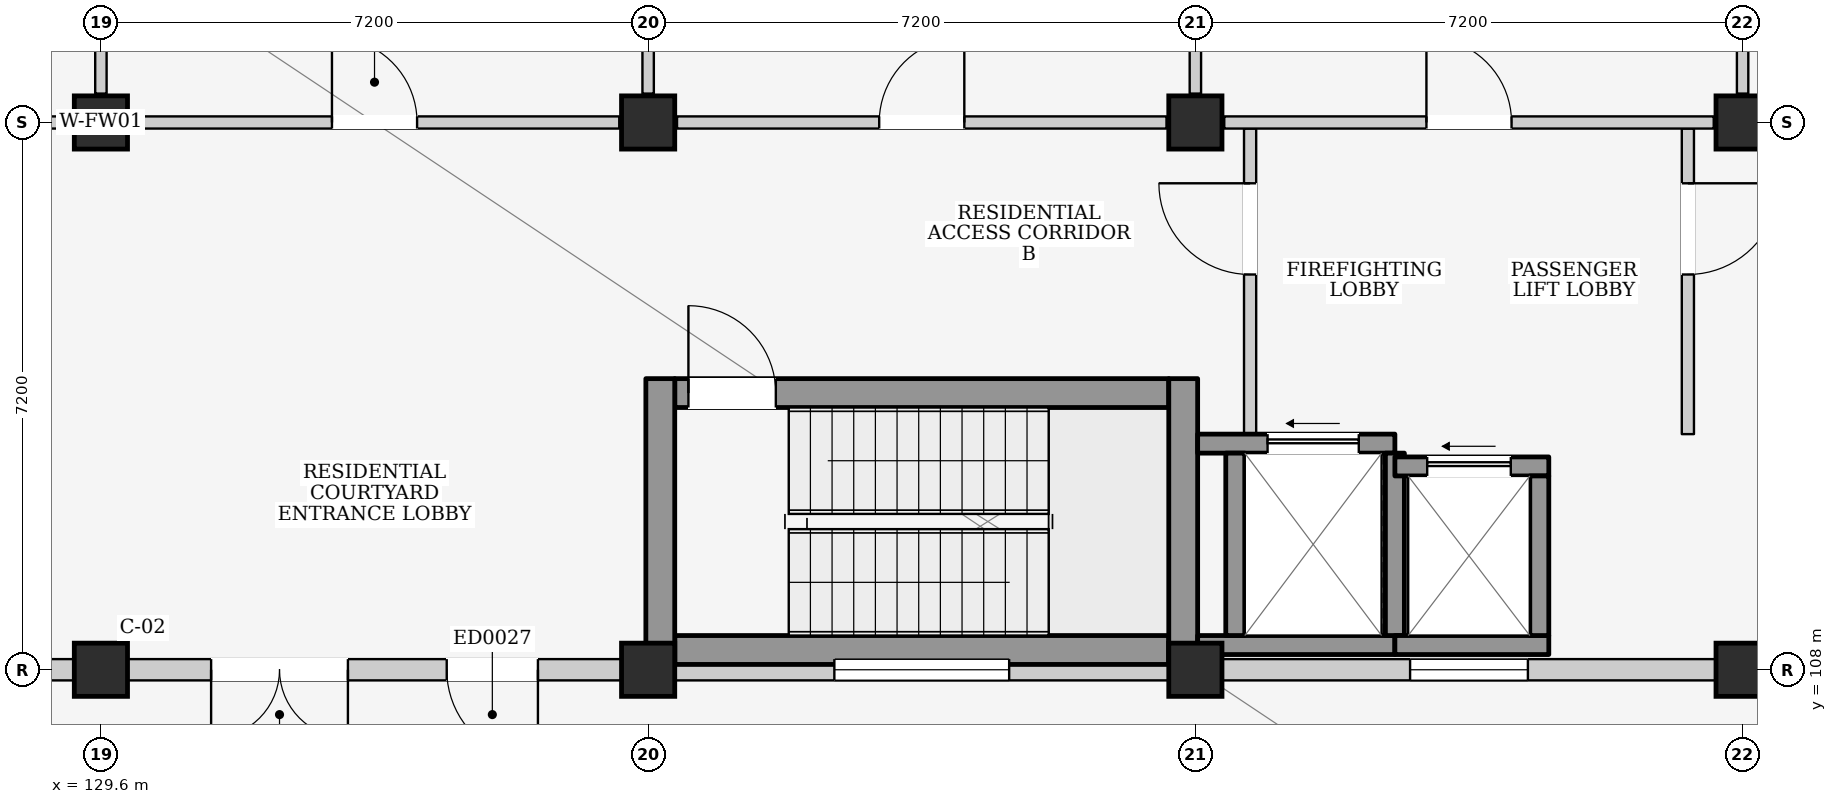
"""IFC4 building model, lengths in metres.
Left out: names, types, materials, properties, quantities, classifications, styles, units other than length and angle.
Written with IfcOpenShell. Run it as: python <this file> out.ifc"""

import sys

from ifc_helpers import new_model, si_unit, direction, frame, frame_2d, origin, origin_2d, place, context, subcontext, project, spatial, rectangle, extrude, element, fill, save


model = new_model("IFC4")
c1 = context("Model", 3, precision=1e-05, world=origin(), true_north=direction((0.0, 1.0)))
c2 = subcontext(c1, "Body", "Model", "MODEL_VIEW")
j1 = project(units=[si_unit("LENGTHUNIT", "METRE"), si_unit("PLANEANGLEUNIT", "RADIAN")], contexts=[c1])
p1 = place(None, origin())
s1 = spatial("IfcSite", under=j1, at=p1, CompositionType="ELEMENT")
p2 = place(p1, origin())
s2 = spatial("IfcBuilding", under=s1, at=p2, CompositionType="ELEMENT")
p3 = place(p2, origin())
s3 = spatial("IfcBuildingStorey", under=s2, at=p3, CompositionType="ELEMENT", Elevation=0.0)
for number, where, z_axis, x_axis in (
    (1, (129.6, 108.0, 0.0), (0.0, 0.0, 1.0), (1.0, 0.0, 0.0)),
    (2, (129.6, 115.2, 0.0), (0.0, 0.0, 1.0), (1.0, 0.0, 0.0)),
    (3, (136.8, 108.0, 0.0), (0.0, 0.0, 1.0), (1.0, 0.0, 0.0)),
    (4, (136.8, 115.2, 0.0), (0.0, 0.0, 1.0), (1.0, 0.0, 0.0)),
    (5, (144.0, 108.0, 0.0), (0.0, 0.0, 1.0), (1.0, 0.0, 0.0)),
    (6, (144.0, 115.2, 0.0), (0.0, 0.0, 1.0), (1.0, 0.0, 0.0)),
    (7, (151.2, 108.0, 0.0), (0.0, 0.0, 1.0), (1.0, 0.0, 0.0)),
    (8, (151.2, 115.2, 0.0), (0.0, 0.0, 1.0), (1.0, 0.0, 0.0)),
):
    element("IfcColumn", number, at=place(p3, frame(where, z_axis=z_axis, x_axis=x_axis)), inside=s3, PredefinedType="COLUMN", context=c2, shape_type="SweptSolid", body=[
        extrude(rectangle(XDim=0.7, YDim=0.7, at=origin_2d()), origin(), (0.0, 0.0, 1.0), 4.5),
    ])
p4 = place(p3, frame((122.75, 108.0, 0.0), z_axis=(0.0, 0.0, 1.0), x_axis=(1.0, 0.0, 0.0)))
e9 = element("IfcWall", 9, at=p4, inside=s3, PredefinedType="ELEMENTEDWALL", context=c2, shape_type="SweptSolid", body=[
    extrude(rectangle(XDim=6.5, YDim=0.28, at=frame_2d((3.25, 0.0))), origin(), (0.0, 0.0, 1.0), 3.435),
])
p5 = place(p4, frame((2.425, 0.0, 0.95)))
e10 = element("IfcOpeningElement", 10, at=p5, cuts=e9, PredefinedType="OPENING", context=c2, shape_type="SweptSolid", body=[
    extrude(rectangle(XDim=1.65, YDim=1.35, at=frame_2d((0.825, 0.675))), frame((0.0, 0.155, 0.0), z_axis=(0.0, -1.0, 0.0), x_axis=(1.0, 0.0, 0.0)), (0.0, 0.0, 1.0), 0.31),
])
p6 = place(p3, frame((129.95, 108.0, 0.0), z_axis=(0.0, 0.0, 1.0), x_axis=(1.0, 0.0, 0.0)))
e11 = element("IfcWall", 11, at=p6, inside=s3, PredefinedType="ELEMENTEDWALL", context=c2, shape_type="SweptSolid", body=[
    extrude(rectangle(XDim=6.5, YDim=0.28, at=frame_2d((3.25, 0.0))), origin(), (0.0, 0.0, 1.0), 3.435),
])
p7 = place(p6, frame((1.1, 0.0, 0.0)))
e12 = element("IfcOpeningElement", 12, at=p7, cuts=e11, PredefinedType="OPENING", context=c2, shape_type="SweptSolid", body=[
    extrude(rectangle(XDim=1.8, YDim=2.4, at=frame_2d((0.9, 1.2))), frame((0.0, 0.155, 0.0), z_axis=(0.0, -1.0, 0.0), x_axis=(1.0, 0.0, 0.0)), (0.0, 0.0, 1.0), 0.31),
])
p8 = place(p6, frame((4.2, 0.0, 0.0)))
e13 = element("IfcOpeningElement", 13, at=p8, cuts=e11, PredefinedType="OPENING", context=c2, shape_type="SweptSolid", body=[
    extrude(rectangle(XDim=1.2, YDim=2.15, at=frame_2d((0.6, 1.075))), frame((0.0, 0.155, 0.0), z_axis=(0.0, -1.0, 0.0), x_axis=(1.0, 0.0, 0.0)), (0.0, 0.0, 1.0), 0.31),
])
p9 = place(p3, frame((137.15, 108.0, 0.0), z_axis=(0.0, 0.0, 1.0), x_axis=(1.0, 0.0, 0.0)))
e14 = element("IfcWall", 14, at=p9, inside=s3, PredefinedType="ELEMENTEDWALL", context=c2, shape_type="SweptSolid", body=[
    extrude(rectangle(XDim=6.5, YDim=0.28, at=frame_2d((3.25, 0.0))), origin(), (0.0, 0.0, 1.0), 3.435),
])
p10 = place(p9, frame((2.1, 0.0, 0.95)))
e15 = element("IfcOpeningElement", 15, at=p10, cuts=e14, PredefinedType="OPENING", context=c2, shape_type="SweptSolid", body=[
    extrude(rectangle(XDim=2.3, YDim=1.6, at=frame_2d((1.15, 0.8))), frame((0.0, 0.155, 0.0), z_axis=(0.0, -1.0, 0.0), x_axis=(1.0, 0.0, 0.0)), (0.0, 0.0, 1.0), 0.31),
])
p11 = place(p3, frame((144.35, 108.0, 0.0), z_axis=(0.0, 0.0, 1.0), x_axis=(1.0, 0.0, 0.0)))
e16 = element("IfcWall", 16, at=p11, inside=s3, PredefinedType="ELEMENTEDWALL", context=c2, shape_type="SweptSolid", body=[
    extrude(rectangle(XDim=6.5, YDim=0.28, at=frame_2d((3.25, 0.0))), origin(), (0.0, 0.0, 1.0), 3.435),
])
p12 = place(p11, frame((2.475, 0.0, 0.95)))
e17 = element("IfcOpeningElement", 17, at=p12, cuts=e16, PredefinedType="OPENING", context=c2, shape_type="SweptSolid", body=[
    extrude(rectangle(XDim=1.55, YDim=1.45, at=frame_2d((0.775, 0.725))), frame((0.0, 0.155, 0.0), z_axis=(0.0, -1.0, 0.0), x_axis=(1.0, 0.0, 0.0)), (0.0, 0.0, 1.0), 0.31),
])
p13 = place(p3, frame((137.15, 108.26, 0.0), z_axis=(0.0, 0.0, 1.0), x_axis=(1.0, 0.0, 0.0)))
e18 = element("IfcWall", 18, at=p13, inside=s3, PredefinedType="SHEAR", context=c2, shape_type="SweptSolid", body=[
    extrude(rectangle(XDim=6.5, YDim=0.38, at=frame_2d((3.25, 0.0))), origin(), (0.0, 0.0, 1.0), 4.2),
])
p14 = place(p3, frame((137.15, 111.64, 0.0), z_axis=(0.0, 0.0, 1.0), x_axis=(1.0, 0.0, 0.0)))
e19 = element("IfcWall", 19, at=p14, inside=s3, PredefinedType="SHEAR", context=c2, shape_type="SweptSolid", body=[
    extrude(rectangle(XDim=6.5, YDim=0.38, at=frame_2d((3.25, 0.0))), origin(), (0.0, 0.0, 1.0), 4.2),
])
p15 = place(p14, frame((0.18, 0.0, 0.0)))
e20 = element("IfcOpeningElement", 20, at=p15, cuts=e19, PredefinedType="OPENING", context=c2, shape_type="SweptSolid", body=[
    extrude(rectangle(XDim=1.15, YDim=2.2, at=frame_2d((0.575, 1.1))), frame((0.0, 0.205, 0.0), z_axis=(0.0, -1.0, 0.0), x_axis=(1.0, 0.0, 0.0)), (0.0, 0.0, 1.0), 0.41),
])
for number, where, z_axis, x_axis in (
    (21, (136.96, 108.07, 0.0), (0.0, 0.0, 1.0), (0.0, 1.0, 0.0)),
    (22, (143.84, 108.07, 0.0), (0.0, 0.0, 1.0), (0.0, 1.0, 0.0)),
):
    element("IfcWall", number, at=place(p3, frame(where, z_axis=z_axis, x_axis=x_axis)), inside=s3, PredefinedType="SHEAR", context=c2, shape_type="SweptSolid", body=[
        extrude(rectangle(XDim=3.76, YDim=0.38, at=frame_2d((1.88, 0.0))), origin(), (0.0, 0.0, 1.0), 4.2),
    ])
p16 = place(p3, frame((144.72, 111.1, 0.0), z_axis=(0.0, 0.0, 1.0), x_axis=(0.0, 1.0, 0.0)))
e23 = element("IfcWall", 23, at=p16, inside=s3, PredefinedType="PARTITIONING", context=c2, shape_type="SweptSolid", body=[
    extrude(rectangle(XDim=4.02, YDim=0.16, at=frame_2d((2.01, 0.0))), origin(), (0.0, 0.0, 1.0), 4.2),
])
p17 = place(p16, frame((2.1, 0.0, 0.0)))
e24 = element("IfcOpeningElement", 24, at=p17, cuts=e23, PredefinedType="OPENING", context=c2, shape_type="SweptSolid", body=[
    extrude(rectangle(XDim=1.2, YDim=2.2, at=frame_2d((0.6, 1.1))), frame((0.0, 0.095, 0.0), z_axis=(0.0, -1.0, 0.0), x_axis=(1.0, 0.0, 0.0)), (0.0, 0.0, 1.0), 0.19),
])
p18 = place(p3, frame((150.48, 111.1, 0.0), z_axis=(0.0, 0.0, 1.0), x_axis=(0.0, 1.0, 0.0)))
e25 = element("IfcWall", 25, at=p18, inside=s3, PredefinedType="PARTITIONING", context=c2, shape_type="SweptSolid", body=[
    extrude(rectangle(XDim=4.02, YDim=0.16, at=frame_2d((2.01, 0.0))), origin(), (0.0, 0.0, 1.0), 4.2),
])
p19 = place(p18, frame((2.1, 0.0, 0.0)))
e26 = element("IfcOpeningElement", 26, at=p19, cuts=e25, PredefinedType="OPENING", context=c2, shape_type="SweptSolid", body=[
    extrude(rectangle(XDim=1.2, YDim=2.2, at=frame_2d((0.6, 1.1))), frame((0.0, 0.095, 0.0), z_axis=(0.0, -1.0, 0.0), x_axis=(1.0, 0.0, 0.0)), (0.0, 0.0, 1.0), 0.19),
])
p20 = place(p3, frame((144.03, 108.325, 0.0), z_axis=(0.0, 0.0, 1.0), x_axis=(1.0, 0.0, 0.0)))
e27 = element("IfcWall", 27, at=p20, inside=s3, PredefinedType="SHEAR", context=c2, shape_type="SweptSolid", body=[
    extrude(rectangle(XDim=2.595, YDim=0.25, at=frame_2d((1.297, 0.0))), origin(), (0.0, 0.0, 1.0), 4.2),
])
p21 = place(p3, frame((144.03, 110.975, 0.0), z_axis=(0.0, 0.0, 1.0), x_axis=(1.0, 0.0, 0.0)))
e28 = element("IfcWall", 28, at=p21, inside=s3, PredefinedType="SHEAR", context=c2, shape_type="SweptSolid", body=[
    extrude(rectangle(XDim=2.595, YDim=0.25, at=frame_2d((1.297, 0.0))), origin(), (0.0, 0.0, 1.0), 4.2),
])
p22 = place(p21, frame((0.92, 0.0, 0.0)))
e29 = element("IfcOpeningElement", 29, at=p22, cuts=e28, PredefinedType="OPENING", context=c2, shape_type="SweptSolid", body=[
    extrude(rectangle(XDim=1.2, YDim=2.25, at=frame_2d((0.6, 1.125))), frame((0.0, 0.14, 0.0), z_axis=(0.0, -1.0, 0.0), x_axis=(1.0, 0.0, 0.0)), (0.0, 0.0, 1.0), 0.28),
])
for number, where, z_axis, x_axis in (
    (30, (144.525, 108.45, 0.0), (0.0, 0.0, 1.0), (0.0, 1.0, 0.0)),
    (31, (146.625, 108.45, 0.0), (0.0, 0.0, 1.0), (0.0, 1.0, 0.0)),
):
    element("IfcWall", number, at=place(p3, frame(where, z_axis=z_axis, x_axis=x_axis)), inside=s3, PredefinedType="SHEAR", context=c2, shape_type="SweptSolid", body=[
        extrude(rectangle(XDim=2.4, YDim=0.25, at=frame_2d((1.2, 0.0))), origin(), (0.0, 0.0, 1.0), 4.2),
    ])
p23 = place(p3, frame((146.625, 108.325, 0.0), z_axis=(0.0, 0.0, 1.0), x_axis=(1.0, 0.0, 0.0)))
e32 = element("IfcWall", 32, at=p23, inside=s3, PredefinedType="SHEAR", context=c2, shape_type="SweptSolid", body=[
    extrude(rectangle(XDim=2.025, YDim=0.25, at=frame_2d((1.012, 0.0))), origin(), (0.0, 0.0, 1.0), 4.2),
])
p24 = place(p3, frame((146.625, 110.675, 0.0), z_axis=(0.0, 0.0, 1.0), x_axis=(1.0, 0.0, 0.0)))
e33 = element("IfcWall", 33, at=p24, inside=s3, PredefinedType="SHEAR", context=c2, shape_type="SweptSolid", body=[
    extrude(rectangle(XDim=2.025, YDim=0.25, at=frame_2d((1.012, 0.0))), origin(), (0.0, 0.0, 1.0), 4.2),
])
p25 = place(p24, frame((0.425, 0.0, 0.0)))
e34 = element("IfcOpeningElement", 34, at=p25, cuts=e33, PredefinedType="OPENING", context=c2, shape_type="SweptSolid", body=[
    extrude(rectangle(XDim=1.1, YDim=2.15, at=frame_2d((0.55, 1.075))), frame((0.0, 0.14, 0.0), z_axis=(0.0, -1.0, 0.0), x_axis=(1.0, 0.0, 0.0)), (0.0, 0.0, 1.0), 0.28),
])
p26 = place(p3, frame((148.525, 108.45, 0.0), z_axis=(0.0, 0.0, 1.0), x_axis=(0.0, 1.0, 0.0)))
e35 = element("IfcWall", 35, at=p26, inside=s3, PredefinedType="SHEAR", context=c2, shape_type="SweptSolid", body=[
    extrude(rectangle(XDim=2.1, YDim=0.25, at=frame_2d((1.05, 0.0))), origin(), (0.0, 0.0, 1.0), 4.2),
])
p27 = place(p3, frame((122.78, 115.2, 0.0), z_axis=(0.0, 0.0, 1.0), x_axis=(1.0, 0.0, 0.0)))
e36 = element("IfcWall", 36, at=p27, inside=s3, PredefinedType="PARTITIONING", context=c2, shape_type="SweptSolid", body=[
    extrude(rectangle(XDim=6.44, YDim=0.16, at=frame_2d((3.22, 0.0))), origin(), (0.0, 0.0, 1.0), 3.435),
])
p28 = place(p27, frame((2.76, 0.0, 0.0)))
e37 = element("IfcOpeningElement", 37, at=p28, cuts=e36, PredefinedType="OPENING", context=c2, shape_type="SweptSolid", body=[
    extrude(rectangle(XDim=1.12, YDim=2.2, at=frame_2d((0.56, 1.1))), frame((0.0, 0.095, 0.0), z_axis=(0.0, -1.0, 0.0), x_axis=(1.0, 0.0, 0.0)), (0.0, 0.0, 1.0), 0.19),
])
p29 = place(p3, frame((129.6, 115.58, 0.0), z_axis=(0.0, 0.0, 1.0), x_axis=(0.0, 1.0, 0.0)))
e38 = element("IfcWall", 38, at=p29, inside=s3, PredefinedType="PARTITIONING", context=c2, shape_type="SweptSolid", body=[
    extrude(rectangle(XDim=6.44, YDim=0.15, at=frame_2d((3.22, 0.0))), origin(), (0.0, 0.0, 1.0), 3.435),
])
p30 = place(p3, frame((129.98, 115.2, 0.0), z_axis=(0.0, 0.0, 1.0), x_axis=(1.0, 0.0, 0.0)))
e39 = element("IfcWall", 39, at=p30, inside=s3, PredefinedType="PARTITIONING", context=c2, shape_type="SweptSolid", body=[
    extrude(rectangle(XDim=6.44, YDim=0.16, at=frame_2d((3.22, 0.0))), origin(), (0.0, 0.0, 1.0), 3.435),
])
p31 = place(p30, frame((2.66, 0.0, 0.0)))
e40 = element("IfcOpeningElement", 40, at=p31, cuts=e39, PredefinedType="OPENING", context=c2, shape_type="SweptSolid", body=[
    extrude(rectangle(XDim=1.12, YDim=2.2, at=frame_2d((0.56, 1.1))), frame((0.0, 0.095, 0.0), z_axis=(0.0, -1.0, 0.0), x_axis=(1.0, 0.0, 0.0)), (0.0, 0.0, 1.0), 0.19),
])
p32 = place(p3, frame((136.8, 115.58, 0.0), z_axis=(0.0, 0.0, 1.0), x_axis=(0.0, 1.0, 0.0)))
e41 = element("IfcWall", 41, at=p32, inside=s3, PredefinedType="PARTITIONING", context=c2, shape_type="SweptSolid", body=[
    extrude(rectangle(XDim=6.44, YDim=0.15, at=frame_2d((3.22, 0.0))), origin(), (0.0, 0.0, 1.0), 3.435),
])
p33 = place(p3, frame((137.18, 115.2, 0.0), z_axis=(0.0, 0.0, 1.0), x_axis=(1.0, 0.0, 0.0)))
e42 = element("IfcWall", 42, at=p33, inside=s3, PredefinedType="PARTITIONING", context=c2, shape_type="SweptSolid", body=[
    extrude(rectangle(XDim=6.44, YDim=0.16, at=frame_2d((3.22, 0.0))), origin(), (0.0, 0.0, 1.0), 3.435),
])
p34 = place(p33, frame((2.66, 0.0, 0.0)))
e43 = element("IfcOpeningElement", 43, at=p34, cuts=e42, PredefinedType="OPENING", context=c2, shape_type="SweptSolid", body=[
    extrude(rectangle(XDim=1.12, YDim=2.2, at=frame_2d((0.56, 1.1))), frame((0.0, 0.095, 0.0), z_axis=(0.0, -1.0, 0.0), x_axis=(1.0, 0.0, 0.0)), (0.0, 0.0, 1.0), 0.19),
])
p35 = place(p3, frame((144.0, 115.58, 0.0), z_axis=(0.0, 0.0, 1.0), x_axis=(0.0, 1.0, 0.0)))
e44 = element("IfcWall", 44, at=p35, inside=s3, PredefinedType="PARTITIONING", context=c2, shape_type="SweptSolid", body=[
    extrude(rectangle(XDim=6.44, YDim=0.15, at=frame_2d((3.22, 0.0))), origin(), (0.0, 0.0, 1.0), 3.435),
])
p36 = place(p3, frame((144.38, 115.2, 0.0), z_axis=(0.0, 0.0, 1.0), x_axis=(1.0, 0.0, 0.0)))
e45 = element("IfcWall", 45, at=p36, inside=s3, PredefinedType="PARTITIONING", context=c2, shape_type="SweptSolid", body=[
    extrude(rectangle(XDim=6.44, YDim=0.16, at=frame_2d((3.22, 0.0))), origin(), (0.0, 0.0, 1.0), 3.435),
])
p37 = place(p36, frame((2.66, 0.0, 0.0)))
e46 = element("IfcOpeningElement", 46, at=p37, cuts=e45, PredefinedType="OPENING", context=c2, shape_type="SweptSolid", body=[
    extrude(rectangle(XDim=1.12, YDim=2.2, at=frame_2d((0.56, 1.1))), frame((0.0, 0.095, 0.0), z_axis=(0.0, -1.0, 0.0), x_axis=(1.0, 0.0, 0.0)), (0.0, 0.0, 1.0), 0.19),
])
p38 = place(p3, frame((151.2, 115.58, 0.0), z_axis=(0.0, 0.0, 1.0), x_axis=(0.0, 1.0, 0.0)))
e47 = element("IfcWall", 47, at=p38, inside=s3, PredefinedType="PARTITIONING", context=c2, shape_type="SweptSolid", body=[
    extrude(rectangle(XDim=6.44, YDim=0.15, at=frame_2d((3.22, 0.0))), origin(), (0.0, 0.0, 1.0), 3.435),
])
p39 = place(p7, frame((1.8, 0.0, 0.0), z_axis=(0.0, 0.0, 1.0), x_axis=(-1.0, 0.0, 0.0)))
e48 = element("IfcDoor", 48, at=p39, inside=s3, OperationType="DOUBLE_DOOR_SINGLE_SWING", PredefinedType="DOOR", context=c2, shape_type="SweptSolid", body=[
    extrude(rectangle(XDim=1.8, YDim=2.4, at=frame_2d((0.9, 1.2))), frame((0.0, 0.025, 0.0), z_axis=(0.0, -1.0, 0.0), x_axis=(1.0, 0.0, 0.0)), (0.0, 0.0, 1.0), 0.05),
])
fill(e12, e48)
p40 = place(p8, frame((1.2, 0.0, 0.0), z_axis=(0.0, 0.0, 1.0), x_axis=(-1.0, 0.0, 0.0)))
e49 = element("IfcDoor", 49, at=p40, inside=s3, OperationType="SINGLE_SWING_LEFT", PredefinedType="DOOR", context=c2, shape_type="SweptSolid", body=[
    extrude(rectangle(XDim=1.2, YDim=2.15, at=frame_2d((0.6, 1.075))), frame((0.0, 0.025, 0.0), z_axis=(0.0, -1.0, 0.0), x_axis=(1.0, 0.0, 0.0)), (0.0, 0.0, 1.0), 0.05),
])
fill(e13, e49)
p41 = place(p10, origin())
e50 = element("IfcWindow", 50, at=p41, inside=s3, PartitioningType="TRIPLE_PANEL_VERTICAL", PredefinedType="WINDOW", context=c2, shape_type="SweptSolid", body=[
    extrude(rectangle(XDim=2.3, YDim=1.6, at=frame_2d((1.15, 0.8))), frame((0.0, 0.03, 0.0), z_axis=(0.0, -1.0, 0.0), x_axis=(1.0, 0.0, 0.0)), (0.0, 0.0, 1.0), 0.06),
])
fill(e15, e50)
p42 = place(p12, origin())
e51 = element("IfcWindow", 51, at=p42, inside=s3, PartitioningType="DOUBLE_PANEL_VERTICAL", PredefinedType="WINDOW", context=c2, shape_type="SweptSolid", body=[
    extrude(rectangle(XDim=1.55, YDim=1.45, at=frame_2d((0.775, 0.725))), frame((0.0, 0.03, 0.0), z_axis=(0.0, -1.0, 0.0), x_axis=(1.0, 0.0, 0.0)), (0.0, 0.0, 1.0), 0.06),
])
fill(e17, e51)
p43 = place(p15, origin())
e52 = element("IfcDoor", 52, at=p43, inside=s3, OperationType="SINGLE_SWING_LEFT", PredefinedType="DOOR", context=c2, shape_type="SweptSolid", body=[
    extrude(rectangle(XDim=1.15, YDim=2.2, at=frame_2d((0.575, 1.1))), frame((0.0, 0.025, 0.0), z_axis=(0.0, -1.0, 0.0), x_axis=(1.0, 0.0, 0.0)), (0.0, 0.0, 1.0), 0.05),
])
fill(e20, e52)
p44 = place(p17, origin())
e53 = element("IfcDoor", 53, at=p44, inside=s3, OperationType="SINGLE_SWING_RIGHT", PredefinedType="DOOR", context=c2, shape_type="SweptSolid", body=[
    extrude(rectangle(XDim=1.2, YDim=2.2, at=frame_2d((0.6, 1.1))), frame((0.0, 0.025, 0.0), z_axis=(0.0, -1.0, 0.0), x_axis=(1.0, 0.0, 0.0)), (0.0, 0.0, 1.0), 0.05),
])
fill(e24, e53)
p45 = place(p19, frame((1.2, 0.0, 0.0), z_axis=(0.0, 0.0, 1.0), x_axis=(-1.0, 0.0, 0.0)))
e54 = element("IfcDoor", 54, at=p45, inside=s3, OperationType="SINGLE_SWING_LEFT", PredefinedType="DOOR", context=c2, shape_type="SweptSolid", body=[
    extrude(rectangle(XDim=1.2, YDim=2.2, at=frame_2d((0.6, 1.1))), frame((0.0, 0.025, 0.0), z_axis=(0.0, -1.0, 0.0), x_axis=(1.0, 0.0, 0.0)), (0.0, 0.0, 1.0), 0.05),
])
fill(e26, e54)
p46 = place(p22, origin())
e55 = element("IfcDoor", 55, at=p46, inside=s3, OperationType="SLIDING_TO_LEFT", PredefinedType="DOOR", context=c2, shape_type="SweptSolid", body=[
    extrude(rectangle(XDim=1.2, YDim=2.25, at=frame_2d((0.6, 1.125))), frame((0.0, 0.025, 0.0), z_axis=(0.0, -1.0, 0.0), x_axis=(1.0, 0.0, 0.0)), (0.0, 0.0, 1.0), 0.05),
])
fill(e29, e55)
p47 = place(p25, origin())
e56 = element("IfcDoor", 56, at=p47, inside=s3, OperationType="SLIDING_TO_LEFT", PredefinedType="DOOR", context=c2, shape_type="SweptSolid", body=[
    extrude(rectangle(XDim=1.1, YDim=2.15, at=frame_2d((0.55, 1.075))), frame((0.0, 0.025, 0.0), z_axis=(0.0, -1.0, 0.0), x_axis=(1.0, 0.0, 0.0)), (0.0, 0.0, 1.0), 0.05),
])
fill(e34, e56)
p48 = place(p31, origin())
e57 = element("IfcDoor", 57, at=p48, inside=s3, OperationType="SINGLE_SWING_LEFT", PredefinedType="DOOR", context=c2, shape_type="SweptSolid", body=[
    extrude(rectangle(XDim=1.12, YDim=2.2, at=frame_2d((0.56, 1.1))), frame((0.0, 0.025, 0.0), z_axis=(0.0, -1.0, 0.0), x_axis=(1.0, 0.0, 0.0)), (0.0, 0.0, 1.0), 0.05),
])
fill(e40, e57)
p49 = place(p34, origin())
e58 = element("IfcDoor", 58, at=p49, inside=s3, OperationType="SINGLE_SWING_RIGHT", PredefinedType="DOOR", context=c2, shape_type="SweptSolid", body=[
    extrude(rectangle(XDim=1.12, YDim=2.2, at=frame_2d((0.56, 1.1))), frame((0.0, 0.025, 0.0), z_axis=(0.0, -1.0, 0.0), x_axis=(1.0, 0.0, 0.0)), (0.0, 0.0, 1.0), 0.05),
])
fill(e43, e58)
p50 = place(p37, origin())
e59 = element("IfcDoor", 59, at=p50, inside=s3, OperationType="SINGLE_SWING_LEFT", PredefinedType="DOOR", context=c2, shape_type="SweptSolid", body=[
    extrude(rectangle(XDim=1.12, YDim=2.2, at=frame_2d((0.56, 1.1))), frame((0.0, 0.025, 0.0), z_axis=(0.0, -1.0, 0.0), x_axis=(1.0, 0.0, 0.0)), (0.0, 0.0, 1.0), 0.05),
])
fill(e46, e59)
save(model, sys.argv[1])
